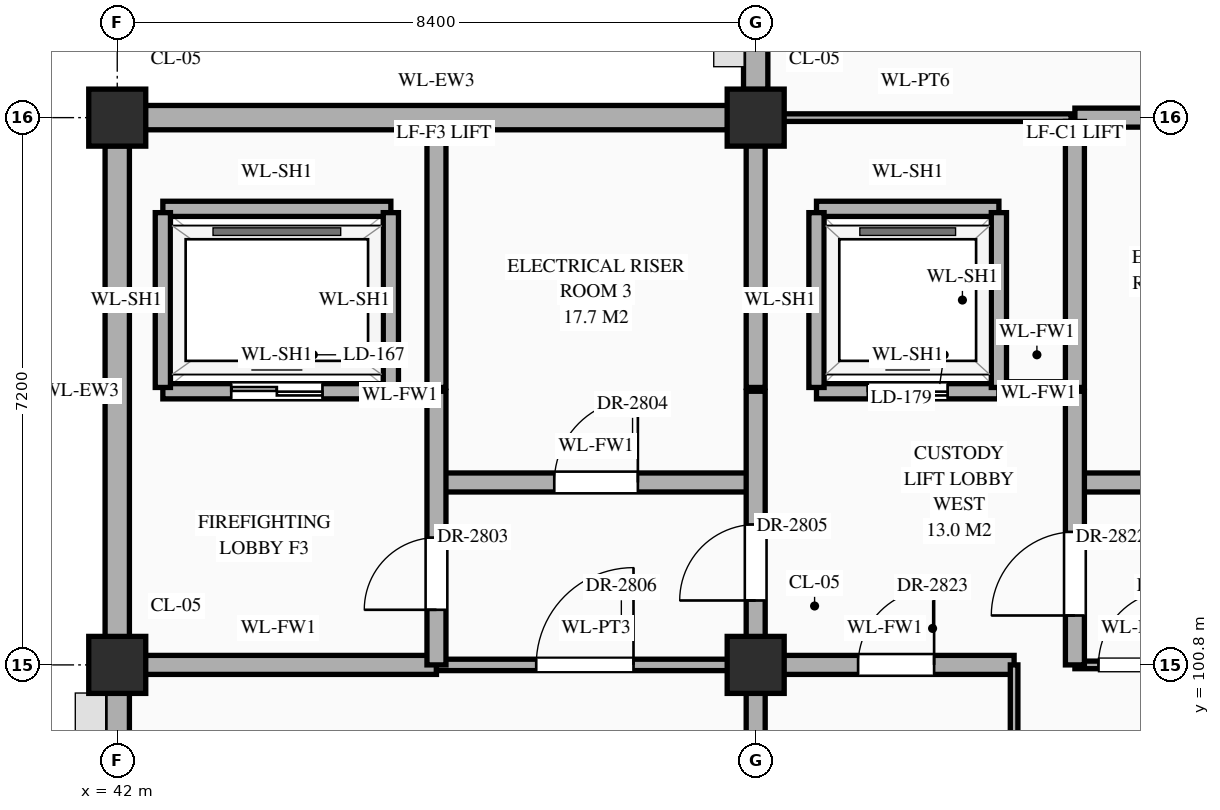
"""IFC4 building model, lengths in metres.
Left out: names, types, materials, properties, quantities, classifications, styles, units other than length and angle.
Written with IfcOpenShell. Run it as: python <this file> out.ifc"""

import sys

from ifc_helpers import new_model, si_unit, direction, frame, frame_2d, origin, origin_2d, place, context, subcontext, project, spatial, rectangle, extrude, element, fill, save


model = new_model("IFC4")
c1 = context("Model", 3, precision=1e-05, world=origin(), true_north=direction((0.0, 1.0)))
c2 = subcontext(c1, "Body", "Model", "MODEL_VIEW")
j1 = project(units=[si_unit("LENGTHUNIT", "METRE"), si_unit("PLANEANGLEUNIT", "RADIAN")], contexts=[c1])
p1 = place(None, origin())
s1 = spatial("IfcSite", under=j1, at=p1, CompositionType="ELEMENT")
p2 = place(p1, origin())
s2 = spatial("IfcBuilding", under=s1, at=p2, CompositionType="ELEMENT")
p3 = place(p2, frame((0.0, 0.0, 43.5)))
s3 = spatial("IfcBuildingStorey", under=s2, at=p3, CompositionType="ELEMENT", Elevation=43.5)
for number, where, z_axis, x_axis in (
    (1, (42.0, 100.8, 0.0), (0.0, 0.0, 1.0), (1.0, 0.0, 0.0)),
    (2, (42.0, 108.0, 0.0), (0.0, 0.0, 1.0), (1.0, 0.0, 0.0)),
    (3, (50.4, 100.8, 0.0), (0.0, 0.0, 1.0), (1.0, 0.0, 0.0)),
    (4, (50.4, 108.0, 0.0), (0.0, 0.0, 1.0), (1.0, 0.0, 0.0)),
):
    element("IfcColumn", number, at=place(p3, frame(where, z_axis=z_axis, x_axis=x_axis)), inside=s3, PredefinedType="COLUMN", context=c2, shape_type="SweptSolid", body=[
        extrude(rectangle(XDim=0.75, YDim=0.75, at=origin_2d()), origin(), (0.0, 0.0, 1.0), 4.2),
    ])
p4 = place(p3, frame((42.0, 93.97, 0.0), z_axis=(0.0, 0.0, 1.0), x_axis=(0.0, 1.0, 0.0)))
e5 = element("IfcWall", 5, at=p4, inside=s3, PredefinedType="STANDARD", context=c2, shape_type="SweptSolid", body=[
    extrude(rectangle(XDim=6.46, YDim=0.32, at=frame_2d((3.23, 0.0))), origin(), (0.0, 0.0, 1.0), 3.35),
])
p5 = place(p4, frame((3.93, 0.0, 0.85)))
e6 = element("IfcOpeningElement", 6, at=p5, cuts=e5, PredefinedType="OPENING", context=c2, shape_type="SweptSolid", body=[
    extrude(rectangle(XDim=1.2, YDim=1.2, at=frame_2d((0.6, 0.6))), frame((0.0, 0.172, 0.0), z_axis=(0.0, -1.0, 0.0), x_axis=(1.0, 0.0, 0.0)), (0.0, 0.0, 1.0), 0.344),
])
p6 = place(p3, frame((42.37, 108.0, 0.0), z_axis=(0.0, 0.0, 1.0), x_axis=(1.0, 0.0, 0.0)))
e7 = element("IfcWall", 7, at=p6, inside=s3, PredefinedType="STANDARD", context=c2, shape_type="SweptSolid", body=[
    extrude(rectangle(XDim=7.66, YDim=0.32, at=frame_2d((3.83, 0.0))), origin(), (0.0, 0.0, 1.0), 3.35),
])
p7 = place(p3, frame((42.0, 101.17, 0.0), z_axis=(0.0, 0.0, 1.0), x_axis=(0.0, 1.0, 0.0)))
e8 = element("IfcWall", 8, at=p7, inside=s3, PredefinedType="STANDARD", context=c2, shape_type="SweptSolid", body=[
    extrude(rectangle(XDim=6.46, YDim=0.32, at=frame_2d((3.23, 0.0))), origin(), (0.0, 0.0, 1.0), 3.35),
])
p8 = place(p3, frame((50.4, 108.37, 0.0), z_axis=(0.0, 0.0, 1.0), x_axis=(0.0, 1.0, 0.0)))
e9 = element("IfcWall", 9, at=p8, inside=s3, PredefinedType="STANDARD", context=c2, shape_type="SweptSolid", body=[
    extrude(rectangle(XDim=6.46, YDim=0.32, at=frame_2d((3.23, 0.0))), origin(), (0.0, 0.0, 1.0), 3.35),
])
p9 = place(p8, frame((3.93, 0.0, 0.85)))
e10 = element("IfcOpeningElement", 10, at=p9, cuts=e9, PredefinedType="OPENING", context=c2, shape_type="SweptSolid", body=[
    extrude(rectangle(XDim=1.2, YDim=1.74, at=frame_2d((0.6, 0.87))), frame((0.0, 0.172, 0.0), z_axis=(0.0, -1.0, 0.0), x_axis=(1.0, 0.0, 0.0)), (0.0, 0.0, 1.0), 0.344),
])
p10 = place(p3, frame((42.04, 100.8, 0.0), z_axis=(0.0, 0.0, 1.0), x_axis=(1.0, 0.0, 0.0)))
e11 = element("IfcWall", 11, at=p10, inside=s3, PredefinedType="STANDARD", context=c2, shape_type="SweptSolid", body=[
    extrude(rectangle(XDim=4.16, YDim=0.25, at=frame_2d((2.08, 0.0))), origin(), (0.0, 0.0, 1.0), 3.15),
])
p11 = place(p3, frame((46.2, 100.8, 0.0), z_axis=(0.0, 0.0, 1.0), x_axis=(1.0, 0.0, 0.0)))
e12 = element("IfcWall", 12, at=p11, inside=s3, PredefinedType="STANDARD", context=c2, shape_type="SweptSolid", body=[
    extrude(rectangle(XDim=4.2, YDim=0.15, at=frame_2d((2.1, 0.0))), origin(), (0.0, 0.0, 1.0), 3.15),
])
p12 = place(p11, frame((1.312, 0.0, 0.0)))
e13 = element("IfcOpeningElement", 13, at=p12, cuts=e12, PredefinedType="OPENING", context=c2, shape_type="SweptSolid", body=[
    extrude(rectangle(XDim=1.28, YDim=2.35, at=frame_2d((0.64, 1.175))), frame((0.0, 0.087, 0.0), z_axis=(0.0, -1.0, 0.0), x_axis=(1.0, 0.0, 0.0)), (0.0, 0.0, 1.0), 0.174),
])
p13 = place(p3, frame((50.4, 100.8, 0.0), z_axis=(0.0, 0.0, 1.0), x_axis=(1.0, 0.0, 0.0)))
e14 = element("IfcWall", 14, at=p13, inside=s3, PredefinedType="STANDARD", context=c2, shape_type="SweptSolid", body=[
    extrude(rectangle(XDim=3.4, YDim=0.25, at=frame_2d((1.7, 0.0))), origin(), (0.0, 0.0, 1.0), 3.1),
])
p14 = place(p13, frame((1.347, 0.0, 0.0)))
e15 = element("IfcOpeningElement", 15, at=p14, cuts=e14, PredefinedType="OPENING", context=c2, shape_type="SweptSolid", body=[
    extrude(rectangle(XDim=1.0, YDim=2.2, at=frame_2d((0.5, 1.1))), frame((0.0, 0.137, 0.0), z_axis=(0.0, -1.0, 0.0), x_axis=(1.0, 0.0, 0.0)), (0.0, 0.0, 1.0), 0.274),
])
p15 = place(p3, frame((54.6, 100.8, 0.0), z_axis=(0.0, 0.0, 1.0), x_axis=(1.0, 0.0, 0.0)))
e16 = element("IfcWall", 16, at=p15, inside=s3, PredefinedType="STANDARD", context=c2, shape_type="SweptSolid", body=[
    extrude(rectangle(XDim=1.6, YDim=0.1, at=frame_2d((0.8, 0.0))), origin(), (0.0, 0.0, 1.0), 3.1),
])
p16 = place(p15, frame((0.31, 0.0, 0.0)))
e17 = element("IfcOpeningElement", 17, at=p16, cuts=e16, PredefinedType="OPENING", context=c2, shape_type="SweptSolid", body=[
    extrude(rectangle(XDim=0.98, YDim=2.35, at=frame_2d((0.49, 1.175))), frame((0.0, 0.062, 0.0), z_axis=(0.0, -1.0, 0.0), x_axis=(1.0, 0.0, 0.0)), (0.0, 0.0, 1.0), 0.124),
])
p17 = place(p3, frame((46.2, 103.2, 0.0), z_axis=(0.0, 0.0, 1.0), x_axis=(1.0, 0.0, 0.0)))
e18 = element("IfcWall", 18, at=p17, inside=s3, PredefinedType="STANDARD", context=c2, shape_type="SweptSolid", body=[
    extrude(rectangle(XDim=4.2, YDim=0.25, at=frame_2d((2.1, 0.0))), origin(), (0.0, 0.0, 1.0), 4.0),
])
p18 = place(p17, frame((1.55, 0.0, 0.0)))
e19 = element("IfcOpeningElement", 19, at=p18, cuts=e18, PredefinedType="OPENING", context=c2, shape_type="SweptSolid", body=[
    extrude(rectangle(XDim=1.1, YDim=2.2, at=frame_2d((0.55, 1.1))), frame((0.0, 0.137, 0.0), z_axis=(0.0, -1.0, 0.0), x_axis=(1.0, 0.0, 0.0)), (0.0, 0.0, 1.0), 0.274),
])
p19 = place(p3, frame((54.6, 103.2, 0.0), z_axis=(0.0, 0.0, 1.0), x_axis=(1.0, 0.0, 0.0)))
e20 = element("IfcWall", 20, at=p19, inside=s3, PredefinedType="STANDARD", context=c2, shape_type="SweptSolid", body=[
    extrude(rectangle(XDim=4.2, YDim=0.25, at=frame_2d((2.1, 0.0))), origin(), (0.0, 0.0, 1.0), 3.95),
])
p20 = place(p19, frame((1.625, 0.0, 0.0)))
e21 = element("IfcOpeningElement", 21, at=p20, cuts=e20, PredefinedType="OPENING", context=c2, shape_type="SweptSolid", body=[
    extrude(rectangle(XDim=0.95, YDim=2.15, at=frame_2d((0.475, 1.075))), frame((0.0, 0.137, 0.0), z_axis=(0.0, -1.0, 0.0), x_axis=(1.0, 0.0, 0.0)), (0.0, 0.0, 1.0), 0.274),
])
p21 = place(p3, frame((42.6, 104.4, 0.0), z_axis=(0.0, 0.0, 1.0), x_axis=(1.0, 0.0, 0.0)))
e22 = element("IfcWall", 22, at=p21, inside=s3, PredefinedType="STANDARD", context=c2, shape_type="SweptSolid", body=[
    extrude(rectangle(XDim=3.0, YDim=0.2, at=frame_2d((1.5, 0.0))), origin(), (0.0, 0.0, 1.0), 4.0),
])
p22 = place(p21, frame((0.9, 0.0, 0.0)))
e23 = element("IfcOpeningElement", 23, at=p22, cuts=e22, PredefinedType="OPENING", context=c2, shape_type="SweptSolid", body=[
    extrude(rectangle(XDim=1.2, YDim=2.15, at=frame_2d((0.6, 1.075))), frame((0.0, 0.112, 0.0), z_axis=(0.0, -1.0, 0.0), x_axis=(1.0, 0.0, 0.0)), (0.0, 0.0, 1.0), 0.224),
])
p23 = place(p3, frame((51.2, 104.4, 0.0), z_axis=(0.0, 0.0, 1.0), x_axis=(1.0, 0.0, 0.0)))
e24 = element("IfcWall", 24, at=p23, inside=s3, PredefinedType="STANDARD", context=c2, shape_type="SweptSolid", body=[
    extrude(rectangle(XDim=2.4, YDim=0.2, at=frame_2d((1.2, 0.0))), origin(), (0.0, 0.0, 1.0), 3.95),
])
p24 = place(p23, frame((0.675, 0.0, 0.0)))
e25 = element("IfcOpeningElement", 25, at=p24, cuts=e24, PredefinedType="OPENING", context=c2, shape_type="SweptSolid", body=[
    extrude(rectangle(XDim=1.05, YDim=2.15, at=frame_2d((0.525, 1.075))), frame((0.0, 0.112, 0.0), z_axis=(0.0, -1.0, 0.0), x_axis=(1.0, 0.0, 0.0)), (0.0, 0.0, 1.0), 0.224),
])
p25 = place(p3, frame((53.65, 104.4, 0.0), z_axis=(0.0, 0.0, 1.0), x_axis=(1.0, 0.0, 0.0)))
e26 = element("IfcWall", 26, at=p25, inside=s3, PredefinedType="STANDARD", context=c2, shape_type="SweptSolid", body=[
    extrude(rectangle(XDim=0.9, YDim=0.25, at=frame_2d((0.45, 0.0))), origin(), (0.0, 0.0, 1.0), 3.95),
])
p26 = place(p3, frame((42.6, 106.8, 0.0), z_axis=(0.0, 0.0, 1.0), x_axis=(1.0, 0.0, 0.0)))
e27 = element("IfcWall", 27, at=p26, inside=s3, PredefinedType="STANDARD", context=c2, shape_type="SweptSolid", body=[
    extrude(rectangle(XDim=3.0, YDim=0.2, at=frame_2d((1.5, 0.0))), origin(), (0.0, 0.0, 1.0), 4.0),
])
p27 = place(p3, frame((51.2, 106.8, 0.0), z_axis=(0.0, 0.0, 1.0), x_axis=(1.0, 0.0, 0.0)))
e28 = element("IfcWall", 28, at=p27, inside=s3, PredefinedType="STANDARD", context=c2, shape_type="SweptSolid", body=[
    extrude(rectangle(XDim=2.4, YDim=0.2, at=frame_2d((1.2, 0.0))), origin(), (0.0, 0.0, 1.0), 3.95),
])
p28 = place(p3, frame((50.45, 108.0, 0.0), z_axis=(0.0, 0.0, 1.0), x_axis=(1.0, 0.0, 0.0)))
e29 = element("IfcWall", 29, at=p28, inside=s3, PredefinedType="STANDARD", context=c2, shape_type="SweptSolid", body=[
    extrude(rectangle(XDim=4.1, YDim=0.1, at=frame_2d((2.05, 0.0))), origin(), (0.0, 0.0, 1.0), 3.1),
])
p29 = place(p3, frame((54.6, 108.0, 0.0), z_axis=(0.0, 0.0, 1.0), x_axis=(1.0, 0.0, 0.0)))
e30 = element("IfcWall", 30, at=p29, inside=s3, PredefinedType="STANDARD", context=c2, shape_type="SweptSolid", body=[
    extrude(rectangle(XDim=4.2, YDim=0.25, at=frame_2d((2.1, 0.0))), origin(), (0.0, 0.0, 1.0), 3.1),
])
p30 = place(p29, frame((1.478, 0.0, 0.0)))
e31 = element("IfcOpeningElement", 31, at=p30, cuts=e30, PredefinedType="OPENING", context=c2, shape_type="SweptSolid", body=[
    extrude(rectangle(XDim=0.95, YDim=2.15, at=frame_2d((0.475, 1.075))), frame((0.0, 0.137, 0.0), z_axis=(0.0, -1.0, 0.0), x_axis=(1.0, 0.0, 0.0)), (0.0, 0.0, 1.0), 0.274),
])
for number, where, z_axis, x_axis in (
    (32, (42.6, 104.45, 0.0), (0.0, 0.0, 1.0), (0.0, 1.0, 0.0)),
    (33, (45.6, 104.45, 0.0), (0.0, 0.0, 1.0), (0.0, 1.0, 0.0)),
):
    element("IfcWall", number, at=place(p3, frame(where, z_axis=z_axis, x_axis=x_axis)), inside=s3, PredefinedType="STANDARD", context=c2, shape_type="SweptSolid", body=[
        extrude(rectangle(XDim=2.3, YDim=0.2, at=frame_2d((1.15, 0.0))), origin(), (0.0, 0.0, 1.0), 4.0),
    ])
p31 = place(p3, frame((46.2, 100.8, 0.0), z_axis=(0.0, 0.0, 1.0), x_axis=(0.0, 1.0, 0.0)))
e34 = element("IfcWall", 34, at=p31, inside=s3, PredefinedType="STANDARD", context=c2, shape_type="SweptSolid", body=[
    extrude(rectangle(XDim=3.6, YDim=0.25, at=frame_2d((1.8, 0.0))), origin(), (0.0, 0.0, 1.0), 4.0),
])
p32 = place(p31, frame((0.725, 0.0, 0.0)))
e35 = element("IfcOpeningElement", 35, at=p32, cuts=e34, PredefinedType="OPENING", context=c2, shape_type="SweptSolid", body=[
    extrude(rectangle(XDim=0.95, YDim=2.15, at=frame_2d((0.475, 1.075))), frame((0.0, 0.137, 0.0), z_axis=(0.0, -1.0, 0.0), x_axis=(1.0, 0.0, 0.0)), (0.0, 0.0, 1.0), 0.274),
])
p33 = place(p3, frame((46.2, 104.45, 0.0), z_axis=(0.0, 0.0, 1.0), x_axis=(0.0, 1.0, 0.0)))
e36 = element("IfcWall", 36, at=p33, inside=s3, PredefinedType="STANDARD", context=c2, shape_type="SweptSolid", body=[
    extrude(rectangle(XDim=3.46, YDim=0.25, at=frame_2d((1.73, 0.0))), origin(), (0.0, 0.0, 1.0), 4.0),
])
p34 = place(p3, frame((50.4, 91.2, 0.0), z_axis=(0.0, 0.0, 1.0), x_axis=(0.0, 1.0, 0.0)))
e37 = element("IfcWall", 37, at=p34, inside=s3, PredefinedType="STANDARD", context=c2, shape_type="SweptSolid", body=[
    extrude(rectangle(XDim=13.2, YDim=0.25, at=frame_2d((6.6, 0.0))), origin(), (0.0, 0.0, 1.0), 3.2),
])
p35 = place(p34, frame((0.552, 0.0, 0.0)))
e38 = element("IfcOpeningElement", 38, at=p35, cuts=e37, PredefinedType="OPENING", context=c2, shape_type="SweptSolid", body=[
    extrude(rectangle(XDim=1.0, YDim=2.2, at=frame_2d((0.5, 1.1))), frame((0.0, 0.137, 0.0), z_axis=(0.0, -1.0, 0.0), x_axis=(1.0, 0.0, 0.0)), (0.0, 0.0, 1.0), 0.274),
])
p36 = place(p34, frame((10.448, 0.0, 0.0)))
e39 = element("IfcOpeningElement", 39, at=p36, cuts=e37, PredefinedType="OPENING", context=c2, shape_type="SweptSolid", body=[
    extrude(rectangle(XDim=1.0, YDim=2.2, at=frame_2d((0.5, 1.1))), frame((0.0, 0.137, 0.0), z_axis=(0.0, -1.0, 0.0), x_axis=(1.0, 0.0, 0.0)), (0.0, 0.0, 1.0), 0.274),
])
p37 = place(p34, frame((3.272, 0.0, 0.0)))
e40 = element("IfcOpeningElement", 40, at=p37, cuts=e37, PredefinedType="OPENING", context=c2, shape_type="SweptSolid", body=[
    extrude(rectangle(XDim=0.95, YDim=2.15, at=frame_2d((0.475, 1.075))), frame((0.0, 0.137, 0.0), z_axis=(0.0, -1.0, 0.0), x_axis=(1.0, 0.0, 0.0)), (0.0, 0.0, 1.0), 0.274),
])
p38 = place(p3, frame((50.4, 104.45, 0.0), z_axis=(0.0, 0.0, 1.0), x_axis=(0.0, 1.0, 0.0)))
e41 = element("IfcWall", 41, at=p38, inside=s3, PredefinedType="STANDARD", context=c2, shape_type="SweptSolid", body=[
    extrude(rectangle(XDim=3.46, YDim=0.25, at=frame_2d((1.73, 0.0))), origin(), (0.0, 0.0, 1.0), 3.2),
])
for number, where, z_axis, x_axis in (
    (42, (51.2, 104.45, 0.0), (0.0, 0.0, 1.0), (0.0, 1.0, 0.0)),
    (43, (53.6, 104.45, 0.0), (0.0, 0.0, 1.0), (0.0, 1.0, 0.0)),
):
    element("IfcWall", number, at=place(p3, frame(where, z_axis=z_axis, x_axis=x_axis)), inside=s3, PredefinedType="STANDARD", context=c2, shape_type="SweptSolid", body=[
        extrude(rectangle(XDim=2.3, YDim=0.2, at=frame_2d((1.15, 0.0))), origin(), (0.0, 0.0, 1.0), 3.95),
    ])
p39 = place(p3, frame((53.8, 96.0, 0.0), z_axis=(0.0, 0.0, 1.0), x_axis=(0.0, 1.0, 0.0)))
e44 = element("IfcWall", 44, at=p39, inside=s3, PredefinedType="STANDARD", context=c2, shape_type="SweptSolid", body=[
    extrude(rectangle(XDim=4.8, YDim=0.1, at=frame_2d((2.4, 0.0))), origin(), (0.0, 0.0, 1.0), 3.95),
])
p40 = place(p39, frame((1.9, 0.0, 0.0)))
e45 = element("IfcOpeningElement", 45, at=p40, cuts=e44, PredefinedType="OPENING", context=c2, shape_type="SweptSolid", body=[
    extrude(rectangle(XDim=1.0, YDim=2.25, at=frame_2d((0.5, 1.125))), frame((0.0, 0.062, 0.0), z_axis=(0.0, -1.0, 0.0), x_axis=(1.0, 0.0, 0.0)), (0.0, 0.0, 1.0), 0.124),
])
p41 = place(p3, frame((54.6, 100.8, 0.0), z_axis=(0.0, 0.0, 1.0), x_axis=(0.0, 1.0, 0.0)))
e46 = element("IfcWall", 46, at=p41, inside=s3, PredefinedType="STANDARD", context=c2, shape_type="SweptSolid", body=[
    extrude(rectangle(XDim=3.6, YDim=0.25, at=frame_2d((1.8, 0.0))), origin(), (0.0, 0.0, 1.0), 3.65),
])
p42 = place(p41, frame((0.65, 0.0, 0.0)))
e47 = element("IfcOpeningElement", 47, at=p42, cuts=e46, PredefinedType="OPENING", context=c2, shape_type="SweptSolid", body=[
    extrude(rectangle(XDim=1.1, YDim=2.2, at=frame_2d((0.55, 1.1))), frame((0.0, 0.137, 0.0), z_axis=(0.0, -1.0, 0.0), x_axis=(1.0, 0.0, 0.0)), (0.0, 0.0, 1.0), 0.274),
])
p43 = place(p3, frame((54.6, 104.45, 0.0), z_axis=(0.0, 0.0, 1.0), x_axis=(0.0, 1.0, 0.0)))
e48 = element("IfcWall", 48, at=p43, inside=s3, PredefinedType="STANDARD", context=c2, shape_type="SweptSolid", body=[
    extrude(rectangle(XDim=3.5, YDim=0.25, at=frame_2d((1.75, 0.0))), origin(), (0.0, 0.0, 1.0), 3.65),
])
p44 = place(p22, origin())
e49 = element("IfcDoor", 49, at=p44, inside=s3, OperationType="DOUBLE_DOOR_SLIDING", PredefinedType="DOOR", context=c2, shape_type="SweptSolid", body=[
    extrude(rectangle(XDim=1.2, YDim=2.15, at=frame_2d((0.6, 1.075))), frame((0.0, 0.025, 0.0), z_axis=(0.0, -1.0, 0.0), x_axis=(1.0, 0.0, 0.0)), (0.0, 0.0, 1.0), 0.05),
])
fill(e23, e49)
p45 = place(p24, origin())
e50 = element("IfcDoor", 50, at=p45, inside=s3, OperationType="DOUBLE_DOOR_SLIDING", PredefinedType="DOOR", context=c2, shape_type="SweptSolid", body=[
    extrude(rectangle(XDim=1.05, YDim=2.15, at=frame_2d((0.525, 1.075))), frame((0.0, 0.025, 0.0), z_axis=(0.0, -1.0, 0.0), x_axis=(1.0, 0.0, 0.0)), (0.0, 0.0, 1.0), 0.05),
])
fill(e25, e50)
p46 = place(p32, origin())
e51 = element("IfcDoor", 51, at=p46, inside=s3, OperationType="SINGLE_SWING_LEFT", PredefinedType="DOOR", context=c2, shape_type="SweptSolid", body=[
    extrude(rectangle(XDim=0.95, YDim=2.15, at=frame_2d((0.475, 1.075))), frame((0.0, 0.025, 0.0), z_axis=(0.0, -1.0, 0.0), x_axis=(1.0, 0.0, 0.0)), (0.0, 0.0, 1.0), 0.05),
])
fill(e35, e51)
p47 = place(p18, origin())
e52 = element("IfcDoor", 52, at=p47, inside=s3, OperationType="SINGLE_SWING_RIGHT", PredefinedType="DOOR", context=c2, shape_type="SweptSolid", body=[
    extrude(rectangle(XDim=1.1, YDim=2.2, at=frame_2d((0.55, 1.1))), frame((0.0, 0.025, 0.0), z_axis=(0.0, -1.0, 0.0), x_axis=(1.0, 0.0, 0.0)), (0.0, 0.0, 1.0), 0.05),
])
fill(e19, e52)
p48 = place(p36, origin())
e53 = element("IfcDoor", 53, at=p48, inside=s3, OperationType="SINGLE_SWING_LEFT", PredefinedType="DOOR", context=c2, shape_type="SweptSolid", body=[
    extrude(rectangle(XDim=1.0, YDim=2.2, at=frame_2d((0.5, 1.1))), frame((0.0, 0.025, 0.0), z_axis=(0.0, -1.0, 0.0), x_axis=(1.0, 0.0, 0.0)), (0.0, 0.0, 1.0), 0.05),
])
fill(e39, e53)
p49 = place(p12, origin())
e54 = element("IfcDoor", 54, at=p49, inside=s3, OperationType="SINGLE_SWING_RIGHT", PredefinedType="DOOR", context=c2, shape_type="SweptSolid", body=[
    extrude(rectangle(XDim=1.28, YDim=2.35, at=frame_2d((0.64, 1.175))), frame((0.0, 0.025, 0.0), z_axis=(0.0, -1.0, 0.0), x_axis=(1.0, 0.0, 0.0)), (0.0, 0.0, 1.0), 0.05),
])
fill(e13, e54)
p50 = place(p42, origin())
e55 = element("IfcDoor", 55, at=p50, inside=s3, OperationType="SINGLE_SWING_LEFT", PredefinedType="DOOR", context=c2, shape_type="SweptSolid", body=[
    extrude(rectangle(XDim=1.1, YDim=2.2, at=frame_2d((0.55, 1.1))), frame((0.0, 0.025, 0.0), z_axis=(0.0, -1.0, 0.0), x_axis=(1.0, 0.0, 0.0)), (0.0, 0.0, 1.0), 0.05),
])
fill(e47, e55)
p51 = place(p14, origin())
e56 = element("IfcDoor", 56, at=p51, inside=s3, OperationType="SINGLE_SWING_RIGHT", PredefinedType="DOOR", context=c2, shape_type="SweptSolid", body=[
    extrude(rectangle(XDim=1.0, YDim=2.2, at=frame_2d((0.5, 1.1))), frame((0.0, 0.025, 0.0), z_axis=(0.0, -1.0, 0.0), x_axis=(1.0, 0.0, 0.0)), (0.0, 0.0, 1.0), 0.05),
])
fill(e15, e56)
p52 = place(p16, origin())
e57 = element("IfcDoor", 57, at=p52, inside=s3, OperationType="SINGLE_SWING_RIGHT", PredefinedType="DOOR", context=c2, shape_type="SweptSolid", body=[
    extrude(rectangle(XDim=0.98, YDim=2.35, at=frame_2d((0.49, 1.175))), frame((0.0, 0.025, 0.0), z_axis=(0.0, -1.0, 0.0), x_axis=(1.0, 0.0, 0.0)), (0.0, 0.0, 1.0), 0.05),
])
fill(e17, e57)
save(model, sys.argv[1])
